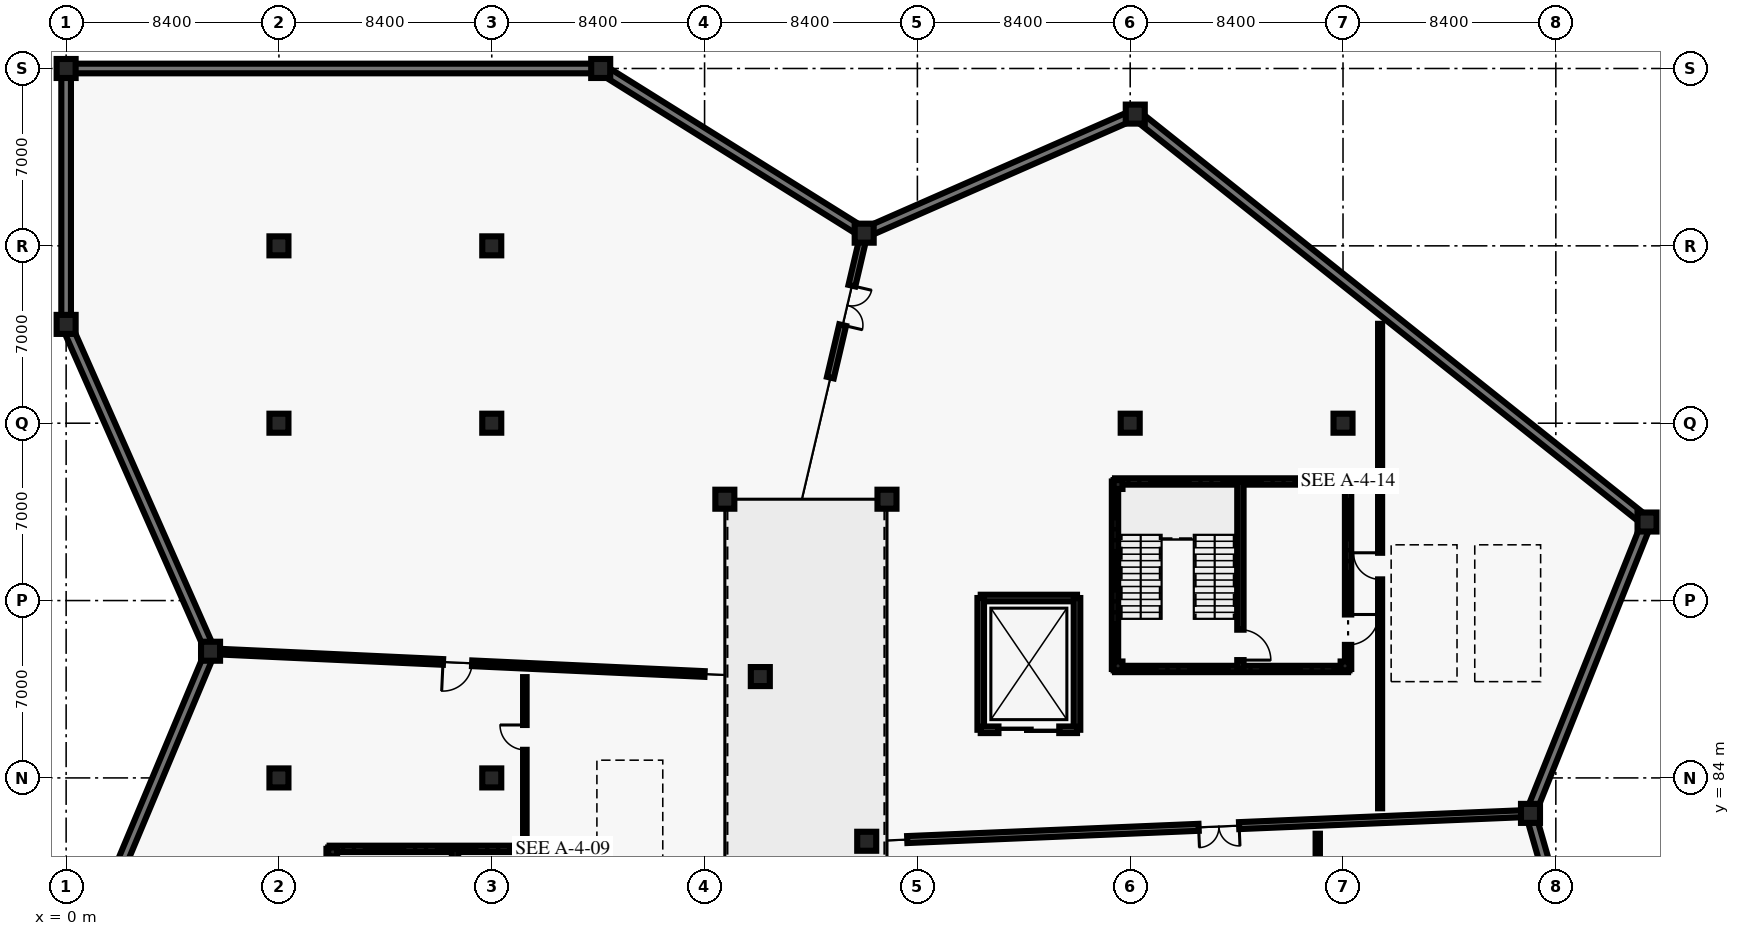
"""IFC4 building model, lengths in metres.
Left out: names, types, materials, properties, quantities, classifications, styles, units other than length and angle.
Written with IfcOpenShell. Run it as: python <this file> out.ifc"""

import sys

from ifc_helpers import new_model, si_unit, direction, frame, frame_2d, origin, origin_2d, place, context, subcontext, project, spatial, rectangle, i_section, extrude, element, fill, save


model = new_model("IFC4")
c1 = context("Model", 3, precision=1e-05, world=origin(), true_north=direction((0.0, 1.0)))
c2 = subcontext(c1, "Body", "Model", "MODEL_VIEW")
j1 = project(units=[si_unit("LENGTHUNIT", "METRE"), si_unit("PLANEANGLEUNIT", "RADIAN")], contexts=[c1])
p1 = place(None, origin())
s1 = spatial("IfcSite", under=j1, at=p1, CompositionType="ELEMENT")
p2 = place(p1, origin())
s2 = spatial("IfcBuilding", under=s1, at=p2, CompositionType="ELEMENT")
p3 = place(p2, frame((0.0, 0.0, -4.5)))
s3 = spatial("IfcBuildingStorey", under=s2, at=p3, CompositionType="ELEMENT", Elevation=-4.5)
for number, where, z_axis, x_axis in (
    (1, (0.0, 101.9, 0.0), (0.0, 0.0, 1.0), (1.0, 0.0, 0.0)),
    (2, (0.0, 112.0, 0.0), (0.0, 0.0, 1.0), (1.0, 0.0, 0.0)),
    (3, (5.7, 89.0, 0.0), (0.0, 0.0, 1.0), (1.0, 0.0, 0.0)),
    (4, (21.1, 112.0, 0.0), (0.0, 0.0, 1.0), (1.0, 0.0, 0.0)),
    (5, (27.4, 88.0, 0.0), (0.0, 0.0, 1.0), (1.0, 0.0, 0.0)),
    (6, (31.5, 105.5, 0.0), (0.0, 0.0, 1.0), (1.0, 0.0, 0.0)),
    (7, (31.6, 81.5, 0.0), (0.0, 0.0, 1.0), (1.0, 0.0, 0.0)),
    (8, (42.2, 110.2, 0.0), (0.0, 0.0, 1.0), (1.0, 0.0, 0.0)),
    (9, (57.8, 82.6, 0.0), (0.0, 0.0, 1.0), (1.0, 0.0, 0.0)),
    (10, (62.4, 94.1, 0.0), (0.0, 0.0, 1.0), (1.0, 0.0, 0.0)),
    (11, (42.0, 98.0, 0.0), (0.0, 0.0, 1.0), (1.0, 0.0, 0.0)),
    (12, (50.4, 98.0, 0.0), (0.0, 0.0, 1.0), (1.0, 0.0, 0.0)),
    (13, (8.4, 84.0, 0.0), (0.0, 0.0, 1.0), (1.0, 0.0, 0.0)),
    (14, (16.8, 84.0, 0.0), (0.0, 0.0, 1.0), (1.0, 0.0, 0.0)),
    (15, (8.4, 98.0, 0.0), (0.0, 0.0, 1.0), (1.0, 0.0, 0.0)),
    (16, (8.4, 105.0, 0.0), (0.0, 0.0, 1.0), (1.0, 0.0, 0.0)),
    (17, (16.8, 98.0, 0.0), (0.0, 0.0, 1.0), (1.0, 0.0, 0.0)),
    (18, (16.8, 105.0, 0.0), (0.0, 0.0, 1.0), (1.0, 0.0, 0.0)),
    (19, (26.0, 95.0, 0.0), (0.0, 0.0, 1.0), (1.0, 0.0, 0.0)),
    (20, (32.4, 95.0, 0.0), (0.0, 0.0, 1.0), (1.0, 0.0, 0.0)),
):
    element("IfcColumn", number, at=place(p3, frame(where, z_axis=z_axis, x_axis=x_axis)), inside=s3, PredefinedType="COLUMN", context=c2, shape_type="SweptSolid", body=[
        extrude(rectangle(XDim=0.75, YDim=0.75, at=origin_2d()), origin(), (0.0, 0.0, 1.0), 4.5),
    ])
for number, where, z_axis, x_axis in (
    (21, (19.48, 81.08, 0.0), (0.0, 0.0, 1.0), (1.0, 0.0, 0.0)),
    (22, (10.52, 81.08, 0.0), (0.0, 0.0, 1.0), (1.0, 0.0, 0.0)),
    (23, (41.52, 88.42, 0.0), (0.0, 0.0, 1.0), (1.0, 0.0, 0.0)),
    (24, (50.48, 88.42, 0.0), (0.0, 0.0, 1.0), (1.0, 0.0, 0.0)),
    (25, (50.48, 95.58, 0.0), (0.0, 0.0, 1.0), (1.0, 0.0, 0.0)),
    (26, (41.52, 95.58, 0.0), (0.0, 0.0, 1.0), (1.0, 0.0, 0.0)),
):
    element("IfcColumn", number, at=place(p3, frame(where, z_axis=z_axis, x_axis=x_axis)), inside=s3, PredefinedType="COLUMN", context=c2, shape_type="SweptSolid", body=[
        extrude(i_section(OverallWidth=0.35, OverallDepth=0.35, WebThickness=0.02, FlangeThickness=0.028, at=origin_2d()), origin(), (0.0, 0.0, 1.0), 4.5),
    ])
p4 = place(p3, frame((60.486, 73.248, 0.0), z_axis=(0.0, 0.0, 1.0), x_axis=(-0.27604330243, 0.961145199844, 0.0)))
e27 = element("IfcWall", 27, at=p4, inside=s3, PredefinedType="USERDEFINED", context=c2, shape_type="SweptSolid", body=[
    extrude(rectangle(XDim=9.68, YDim=0.38, at=frame_2d((4.84, 0.0))), origin(), (0.0, 0.0, 1.0), 4.14),
])
p5 = place(p3, frame((57.819, 82.646, 0.0), z_axis=(0.0, 0.0, 1.0), x_axis=(0.371332668442, 0.928499891948, 0.0)))
e28 = element("IfcWall", 28, at=p5, inside=s3, PredefinedType="USERDEFINED", context=c2, shape_type="SweptSolid", body=[
    extrude(rectangle(XDim=12.336, YDim=0.38, at=frame_2d((6.168, 0.0))), origin(), (0.0, 0.0, 1.0), 4.14),
])
p6 = place(p3, frame((62.4, 94.1, 0.0), z_axis=(0.0, 0.0, 1.0), x_axis=(-0.78200261515, 0.623275147827, 0.0)))
e29 = element("IfcWall", 29, at=p6, inside=s3, PredefinedType="USERDEFINED", context=c2, shape_type="SweptSolid", body=[
    extrude(rectangle(XDim=25.831, YDim=0.38, at=frame_2d((12.916, 0.0))), origin(), (0.0, 0.0, 1.0), 4.14),
])
p7 = place(p3, frame((42.2, 110.2, 0.0), z_axis=(0.0, 0.0, 1.0), x_axis=(-0.915563585263, -0.402173247918, 0.0)))
e30 = element("IfcWall", 30, at=p7, inside=s3, PredefinedType="USERDEFINED", context=c2, shape_type="SweptSolid", body=[
    extrude(rectangle(XDim=11.637, YDim=0.38, at=frame_2d((5.818, 0.0))), origin(), (0.0, 0.0, 1.0), 4.14),
])
p8 = place(p3, frame((5.681, 88.954, 0.0), z_axis=(0.0, 0.0, 1.0), x_axis=(-0.386546655602, -0.922269853699, 0.0)))
e31 = element("IfcWall", 31, at=p8, inside=s3, PredefinedType="USERDEFINED", context=c2, shape_type="SweptSolid", body=[
    extrude(rectangle(XDim=14.697, YDim=0.38, at=frame_2d((7.348, 0.0))), origin(), (0.0, 0.0, 1.0), 4.14),
])
p9 = place(p3, frame((31.458, 105.526, 0.0), z_axis=(0.0, 0.0, 1.0), x_axis=(-0.847982583258, 0.530024092369, 0.0)))
e32 = element("IfcWall", 32, at=p9, inside=s3, PredefinedType="USERDEFINED", context=c2, shape_type="SweptSolid", body=[
    extrude(rectangle(XDim=12.215, YDim=0.38, at=frame_2d((6.107, 0.0))), origin(), (0.0, 0.0, 1.0), 4.14),
])
p10 = place(p3, frame((21.1, 112.0, 0.0), z_axis=(0.0, 0.0, 1.0), x_axis=(-1.0, 0.0, 0.0)))
e33 = element("IfcWall", 33, at=p10, inside=s3, PredefinedType="USERDEFINED", context=c2, shape_type="SweptSolid", body=[
    extrude(rectangle(XDim=21.1, YDim=0.38, at=frame_2d((10.55, 0.0))), origin(), (0.0, 0.0, 1.0), 4.14),
])
p11 = place(p3, frame((0.0, 112.0, 0.0), z_axis=(0.0, 0.0, 1.0), x_axis=(0.0, -1.0, 0.0)))
e34 = element("IfcWall", 34, at=p11, inside=s3, PredefinedType="USERDEFINED", context=c2, shape_type="SweptSolid", body=[
    extrude(rectangle(XDim=10.1, YDim=0.38, at=frame_2d((5.05, 0.0))), origin(), (0.0, 0.0, 1.0), 4.14),
])
p12 = place(p3, frame((0.0, 101.9, 0.0), z_axis=(0.0, 0.0, 1.0), x_axis=(0.404179059324, -0.914679882803, 0.0)))
e35 = element("IfcWall", 35, at=p12, inside=s3, PredefinedType="USERDEFINED", context=c2, shape_type="SweptSolid", body=[
    extrude(rectangle(XDim=14.053, YDim=0.38, at=frame_2d((7.026, 0.0))), origin(), (0.0, 0.0, 1.0), 4.14),
])
p13 = place(p3, frame((57.8, 82.6, 0.0), z_axis=(0.0, 0.0, 1.0), x_axis=(-0.999119166836, -0.041962965345, 0.0)))
e36 = element("IfcWall", 36, at=p13, inside=s3, PredefinedType="SOLIDWALL", context=c2, shape_type="SweptSolid", body=[
    extrude(rectangle(XDim=24.622, YDim=0.275, at=frame_2d((12.311, 0.0))), origin(), (0.0, 0.0, 1.0), 4.14),
])
p14 = place(p13, frame((11.511, 0.0, 0.0)))
e37 = element("IfcOpeningElement", 37, at=p14, cuts=e36, PredefinedType="OPENING", context=c2, shape_type="SweptSolid", body=[
    extrude(rectangle(XDim=1.6, YDim=2.45, at=frame_2d((0.8, 1.225))), frame((0.0, 0.147, 0.0), z_axis=(0.0, -1.0, 0.0), x_axis=(1.0, 0.0, 0.0)), (0.0, 0.0, 1.0), 0.295),
])
p15 = place(p3, frame((31.5, 105.5, 0.0), z_axis=(0.0, 0.0, 1.0), x_axis=(-0.228035044918, -0.973652924963, 0.0)))
e38 = element("IfcWall", 38, at=p15, inside=s3, PredefinedType="SOLIDWALL", context=c2, shape_type="SweptSolid", body=[
    extrude(rectangle(XDim=5.854, YDim=0.275, at=frame_2d((2.927, 0.0))), origin(), (0.0, 0.0, 1.0), 4.14),
])
p16 = place(p15, frame((2.127, 0.0, 0.0)))
e39 = element("IfcOpeningElement", 39, at=p16, cuts=e38, PredefinedType="OPENING", context=c2, shape_type="SweptSolid", body=[
    extrude(rectangle(XDim=1.6, YDim=2.45, at=frame_2d((0.8, 1.225))), frame((0.0, 0.147, 0.0), z_axis=(0.0, -1.0, 0.0), x_axis=(1.0, 0.0, 0.0)), (0.0, 0.0, 1.0), 0.295),
])
p17 = place(p3, frame((25.2, 88.101, 0.0), z_axis=(0.0, 0.0, 1.0), x_axis=(-0.998939142773, 0.046049853812, 0.0)))
e40 = element("IfcWall", 40, at=p17, inside=s3, PredefinedType="SOLIDWALL", context=c2, shape_type="SweptSolid", body=[
    extrude(rectangle(XDim=19.521, YDim=0.225, at=frame_2d((9.76, 0.0))), origin(), (0.0, 0.0, 1.0), 4.14),
])
p18 = place(p17, frame((9.185, 0.0, 0.0)))
e41 = element("IfcOpeningElement", 41, at=p18, cuts=e40, PredefinedType="OPENING", context=c2, shape_type="SweptSolid", body=[
    extrude(rectangle(XDim=1.15, YDim=2.2, at=frame_2d((0.575, 1.1))), frame((0.0, 0.123, 0.0), z_axis=(0.0, -1.0, 0.0), x_axis=(1.0, 0.0, 0.0)), (0.0, 0.0, 1.0), 0.245),
])
p19 = place(p3, frame((49.403, 57.267, 0.0), z_axis=(0.0, 0.0, 1.0), x_axis=(0.0, 1.0, 0.0)))
e42 = element("IfcWall", 42, at=p19, inside=s3, PredefinedType="PARTITIONING", context=c2, shape_type="SweptSolid", body=[
    extrude(rectangle(XDim=24.53, YDim=0.17, at=frame_2d((12.265, 0.0))), origin(), (0.0, 0.0, 1.0), 3.02),
])
p20 = place(p19, frame((11.715, 0.0, 0.0)))
e43 = element("IfcOpeningElement", 43, at=p20, cuts=e42, PredefinedType="OPENING", context=c2, shape_type="SweptSolid", body=[
    extrude(rectangle(XDim=1.1, YDim=2.2, at=frame_2d((0.55, 1.1))), frame((0.0, 0.095, 0.0), z_axis=(0.0, -1.0, 0.0), x_axis=(1.0, 0.0, 0.0)), (0.0, 0.0, 1.0), 0.19),
])
p21 = place(p3, frame((51.864, 82.801, 0.0), z_axis=(0.0, 0.0, 1.0), x_axis=(0.0, 1.0, 0.0)))
e44 = element("IfcWall", 44, at=p21, inside=s3, PredefinedType="PARTITIONING", context=c2, shape_type="SweptSolid", body=[
    extrude(rectangle(XDim=19.121, YDim=0.16, at=frame_2d((9.561, 0.0))), origin(), (0.0, 0.0, 1.0), 3.02),
])
p22 = place(p21, frame((9.035, 0.0, 0.0)))
e45 = element("IfcOpeningElement", 45, at=p22, cuts=e44, PredefinedType="OPENING", context=c2, shape_type="SweptSolid", body=[
    extrude(rectangle(XDim=1.05, YDim=2.2, at=frame_2d((0.525, 1.1))), frame((0.0, 0.09, 0.0), z_axis=(0.0, -1.0, 0.0), x_axis=(1.0, 0.0, 0.0)), (0.0, 0.0, 1.0), 0.18),
])
p23 = place(p3, frame((18.106, 81.6, 0.0), z_axis=(0.0, 0.0, 1.0), x_axis=(0.0, 1.0, 0.0)))
e46 = element("IfcWall", 46, at=p23, inside=s3, PredefinedType="PARTITIONING", context=c2, shape_type="SweptSolid", body=[
    extrude(rectangle(XDim=6.378, YDim=0.14, at=frame_2d((3.189, 0.0))), origin(), (0.0, 0.0, 1.0), 3.02),
])
p24 = place(p23, frame((3.509, 0.0, 0.0)))
e47 = element("IfcOpeningElement", 47, at=p24, cuts=e46, PredefinedType="OPENING", context=c2, shape_type="SweptSolid", body=[
    extrude(rectangle(XDim=0.98, YDim=2.15, at=frame_2d((0.49, 1.075))), frame((0.0, 0.08, 0.0), z_axis=(0.0, -1.0, 0.0), x_axis=(1.0, 0.0, 0.0)), (0.0, 0.0, 1.0), 0.16),
])
p25 = place(p3, frame((10.4, 73.8, 0.0), z_axis=(0.0, 0.0, 1.0), x_axis=(0.0, 1.0, 0.0)))
e48 = element("IfcWall", 48, at=p25, inside=s3, PredefinedType="SHEAR", context=c2, shape_type="SweptSolid", body=[
    extrude(rectangle(XDim=7.4, YDim=0.25, at=frame_2d((3.7, 0.0))), origin(), (0.0, 0.0, 1.0), 4.14),
])
p26 = place(p3, frame((10.4, 81.2, 0.0), z_axis=(0.0, 0.0, 1.0), x_axis=(1.0, 0.0, 0.0)))
e49 = element("IfcWall", 49, at=p26, inside=s3, PredefinedType="SHEAR", context=c2, shape_type="SweptSolid", body=[
    extrude(rectangle(XDim=9.2, YDim=0.25, at=frame_2d((4.6, 0.0))), origin(), (0.0, 0.0, 1.0), 4.14),
])
p27 = place(p3, frame((19.6, 81.2, 0.0), z_axis=(0.0, 0.0, 1.0), x_axis=(0.0, -1.0, 0.0)))
e50 = element("IfcWall", 50, at=p27, inside=s3, PredefinedType="SHEAR", context=c2, shape_type="SweptSolid", body=[
    extrude(rectangle(XDim=7.4, YDim=0.25, at=frame_2d((3.7, 0.0))), origin(), (0.0, 0.0, 1.0), 4.14),
])
p28 = place(p27, frame((5.25, 0.0, 0.0)))
e51 = element("IfcOpeningElement", 51, at=p28, cuts=e50, PredefinedType="OPENING", context=c2, shape_type="SweptSolid", body=[
    extrude(rectangle(XDim=1.2, YDim=2.2, at=frame_2d((0.6, 1.1))), frame((0.0, 0.135, 0.0), z_axis=(0.0, -1.0, 0.0), x_axis=(1.0, 0.0, 0.0)), (0.0, 0.0, 1.0), 0.27),
])
p29 = place(p3, frame((15.35, 81.2, 0.0), z_axis=(0.0, 0.0, 1.0), x_axis=(0.0, -1.0, 0.0)))
e52 = element("IfcWall", 52, at=p29, inside=s3, PredefinedType="SHEAR", context=c2, shape_type="SweptSolid", body=[
    extrude(rectangle(XDim=7.4, YDim=0.25, at=frame_2d((3.7, 0.0))), origin(), (0.0, 0.0, 1.0), 4.14),
])
p30 = place(p29, frame((5.85, 0.0, 0.0)))
e53 = element("IfcOpeningElement", 53, at=p30, cuts=e52, PredefinedType="OPENING", context=c2, shape_type="SweptSolid", body=[
    extrude(rectangle(XDim=1.2, YDim=2.2, at=frame_2d((0.6, 1.1))), frame((0.0, 0.135, 0.0), z_axis=(0.0, -1.0, 0.0), x_axis=(1.0, 0.0, 0.0)), (0.0, 0.0, 1.0), 0.27),
])
p31 = place(p3, frame((41.4, 88.3, 0.0), z_axis=(0.0, 0.0, 1.0), x_axis=(0.0, 1.0, 0.0)))
e54 = element("IfcWall", 54, at=p31, inside=s3, PredefinedType="SHEAR", context=c2, shape_type="SweptSolid", body=[
    extrude(rectangle(XDim=7.4, YDim=0.25, at=frame_2d((3.7, 0.0))), origin(), (0.0, 0.0, 1.0), 4.14),
])
for number, where, z_axis, x_axis in (
    (55, (41.4, 95.7, 0.0), (0.0, 0.0, 1.0), (1.0, 0.0, 0.0)),
    (56, (50.6, 88.3, 0.0), (0.0, 0.0, 1.0), (-1.0, 0.0, 0.0)),
):
    element("IfcWall", number, at=place(p3, frame(where, z_axis=z_axis, x_axis=x_axis)), inside=s3, PredefinedType="SHEAR", context=c2, shape_type="SweptSolid", body=[
        extrude(rectangle(XDim=9.2, YDim=0.25, at=frame_2d((4.6, 0.0))), origin(), (0.0, 0.0, 1.0), 4.14),
    ])
p32 = place(p3, frame((50.6, 95.7, 0.0), z_axis=(0.0, 0.0, 1.0), x_axis=(0.0, -1.0, 0.0)))
e57 = element("IfcWall", 57, at=p32, inside=s3, PredefinedType="SHEAR", context=c2, shape_type="SweptSolid", body=[
    extrude(rectangle(XDim=7.4, YDim=0.25, at=frame_2d((3.7, 0.0))), origin(), (0.0, 0.0, 1.0), 4.14),
])
p33 = place(p32, frame((5.25, 0.0, 0.0)))
e58 = element("IfcOpeningElement", 58, at=p33, cuts=e57, PredefinedType="OPENING", context=c2, shape_type="SweptSolid", body=[
    extrude(rectangle(XDim=1.2, YDim=2.2, at=frame_2d((0.6, 1.1))), frame((0.0, 0.135, 0.0), z_axis=(0.0, -1.0, 0.0), x_axis=(1.0, 0.0, 0.0)), (0.0, 0.0, 1.0), 0.27),
])
p34 = place(p3, frame((46.35, 95.7, 0.0), z_axis=(0.0, 0.0, 1.0), x_axis=(0.0, -1.0, 0.0)))
e59 = element("IfcWall", 59, at=p34, inside=s3, PredefinedType="SHEAR", context=c2, shape_type="SweptSolid", body=[
    extrude(rectangle(XDim=7.4, YDim=0.25, at=frame_2d((3.7, 0.0))), origin(), (0.0, 0.0, 1.0), 4.14),
])
p35 = place(p34, frame((5.85, 0.0, 0.0)))
e60 = element("IfcOpeningElement", 60, at=p35, cuts=e59, PredefinedType="OPENING", context=c2, shape_type="SweptSolid", body=[
    extrude(rectangle(XDim=1.2, YDim=2.2, at=frame_2d((0.6, 1.1))), frame((0.0, 0.135, 0.0), z_axis=(0.0, -1.0, 0.0), x_axis=(1.0, 0.0, 0.0)), (0.0, 0.0, 1.0), 0.27),
])
p36 = place(p3, frame((36.1, 91.1, 0.0), z_axis=(0.0, 0.0, 1.0), x_axis=(1.0, 0.0, 0.0)))
e61 = element("IfcWall", 61, at=p36, inside=s3, PredefinedType="SHEAR", context=c2, shape_type="SweptSolid", body=[
    extrude(rectangle(XDim=3.8, YDim=0.26, at=frame_2d((1.9, 0.0))), origin(), (0.0, 0.0, 1.0), 4.26),
])
for number, where, z_axis, x_axis in (
    (62, (39.9, 91.1, 0.0), (0.0, 0.0, 1.0), (0.0, -1.0, 0.0)),
    (63, (36.1, 85.9, 0.0), (0.0, 0.0, 1.0), (0.0, 1.0, 0.0)),
):
    element("IfcWall", number, at=place(p3, frame(where, z_axis=z_axis, x_axis=x_axis)), inside=s3, PredefinedType="SHEAR", context=c2, shape_type="SweptSolid", body=[
        extrude(rectangle(XDim=5.2, YDim=0.26, at=frame_2d((2.6, 0.0))), origin(), (0.0, 0.0, 1.0), 4.26),
    ])
p37 = place(p3, frame((39.9, 85.9, 0.0), z_axis=(0.0, 0.0, 1.0), x_axis=(-1.0, 0.0, 0.0)))
e64 = element("IfcWall", 64, at=p37, inside=s3, PredefinedType="SHEAR", context=c2, shape_type="SweptSolid", body=[
    extrude(rectangle(XDim=3.8, YDim=0.26, at=frame_2d((1.9, 0.0))), origin(), (0.0, 0.0, 1.0), 4.26),
])
p38 = place(p37, frame((0.7, 0.0, 0.0)))
e65 = element("IfcOpeningElement", 65, at=p38, cuts=e64, PredefinedType="OPENING", context=c2, shape_type="SweptSolid", body=[
    extrude(rectangle(XDim=2.4, YDim=2.85, at=frame_2d((1.2, 1.425))), frame((0.0, 0.14, 0.0), z_axis=(0.0, -1.0, 0.0), x_axis=(1.0, 0.0, 0.0)), (0.0, 0.0, 1.0), 0.28),
])
p39 = place(p14, origin())
e66 = element("IfcDoor", 66, at=p39, inside=s3, OperationType="DOUBLE_DOOR_SINGLE_SWING", PredefinedType="DOOR", context=c2, shape_type="SweptSolid", body=[
    extrude(rectangle(XDim=1.6, YDim=2.45, at=frame_2d((0.8, 1.225))), frame((0.0, 0.025, 0.0), z_axis=(0.0, -1.0, 0.0), x_axis=(1.0, 0.0, 0.0)), (0.0, 0.0, 1.0), 0.05),
])
fill(e37, e66)
p40 = place(p16, origin())
e67 = element("IfcDoor", 67, at=p40, inside=s3, OperationType="DOUBLE_DOOR_SINGLE_SWING", PredefinedType="DOOR", context=c2, shape_type="SweptSolid", body=[
    extrude(rectangle(XDim=1.6, YDim=2.45, at=frame_2d((0.8, 1.225))), frame((0.0, 0.025, 0.0), z_axis=(0.0, -1.0, 0.0), x_axis=(1.0, 0.0, 0.0)), (0.0, 0.0, 1.0), 0.05),
])
fill(e39, e67)
p41 = place(p18, origin())
e68 = element("IfcDoor", 68, at=p41, inside=s3, OperationType="SINGLE_SWING_RIGHT", PredefinedType="DOOR", context=c2, shape_type="SweptSolid", body=[
    extrude(rectangle(XDim=1.15, YDim=2.2, at=frame_2d((0.575, 1.1))), frame((0.0, 0.025, 0.0), z_axis=(0.0, -1.0, 0.0), x_axis=(1.0, 0.0, 0.0)), (0.0, 0.0, 1.0), 0.05),
])
fill(e41, e68)
p42 = place(p22, origin())
e69 = element("IfcDoor", 69, at=p42, inside=s3, OperationType="SINGLE_SWING_RIGHT", PredefinedType="DOOR", context=c2, shape_type="SweptSolid", body=[
    extrude(rectangle(XDim=1.05, YDim=2.2, at=frame_2d((0.525, 1.1))), frame((0.0, 0.025, 0.0), z_axis=(0.0, -1.0, 0.0), x_axis=(1.0, 0.0, 0.0)), (0.0, 0.0, 1.0), 0.05),
])
fill(e45, e69)
p43 = place(p24, origin())
e70 = element("IfcDoor", 70, at=p43, inside=s3, OperationType="SINGLE_SWING_RIGHT", PredefinedType="DOOR", context=c2, shape_type="SweptSolid", body=[
    extrude(rectangle(XDim=0.98, YDim=2.15, at=frame_2d((0.49, 1.075))), frame((0.0, 0.025, 0.0), z_axis=(0.0, -1.0, 0.0), x_axis=(1.0, 0.0, 0.0)), (0.0, 0.0, 1.0), 0.05),
])
fill(e47, e70)
p44 = place(p33, origin())
e71 = element("IfcDoor", 71, at=p44, inside=s3, OperationType="SINGLE_SWING_LEFT", PredefinedType="DOOR", context=c2, shape_type="SweptSolid", body=[
    extrude(rectangle(XDim=1.2, YDim=2.2, at=frame_2d((0.6, 1.1))), frame((0.0, 0.025, 0.0), z_axis=(0.0, -1.0, 0.0), x_axis=(1.0, 0.0, 0.0)), (0.0, 0.0, 1.0), 0.05),
])
fill(e58, e71)
p45 = place(p35, origin())
e72 = element("IfcDoor", 72, at=p45, inside=s3, OperationType="SINGLE_SWING_RIGHT", PredefinedType="DOOR", context=c2, shape_type="SweptSolid", body=[
    extrude(rectangle(XDim=1.2, YDim=2.2, at=frame_2d((0.6, 1.1))), frame((0.0, 0.025, 0.0), z_axis=(0.0, -1.0, 0.0), x_axis=(1.0, 0.0, 0.0)), (0.0, 0.0, 1.0), 0.05),
])
fill(e60, e72)
p46 = place(p38, origin())
e73 = element("IfcDoor", 73, at=p46, inside=s3, OperationType="SLIDING_TO_LEFT", PredefinedType="DOOR", context=c2, shape_type="SweptSolid", body=[
    extrude(rectangle(XDim=2.4, YDim=2.85, at=frame_2d((1.2, 1.425))), frame((0.0, 0.025, 0.0), z_axis=(0.0, -1.0, 0.0), x_axis=(1.0, 0.0, 0.0)), (0.0, 0.0, 1.0), 0.05),
])
fill(e65, e73)
save(model, sys.argv[1])
